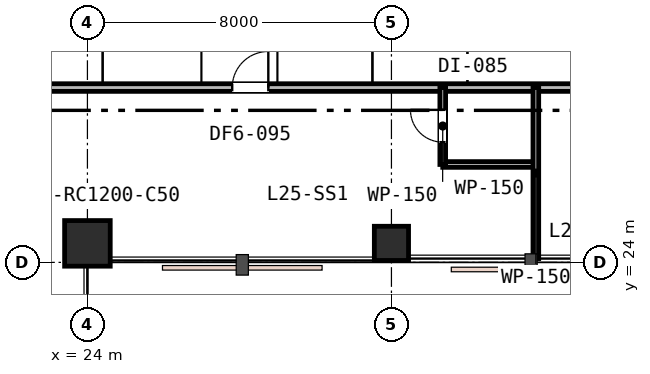
"""IFC4 building model, lengths in metres.
Left out: names, types, materials, properties, quantities, classifications, styles, units other than length and angle.
Written with IfcOpenShell. Run it as: python <this file> out.ifc"""

import sys

from ifc_helpers import new_model, si_unit, direction, frame, frame_2d, origin, origin_2d, place, context, subcontext, project, spatial, rectangle, extrude, element, fill, save


model = new_model("IFC4")
c1 = context("Model", 3, precision=1e-05, world=origin(), true_north=direction((0.0, 1.0)))
c2 = subcontext(c1, "Body", "Model", "MODEL_VIEW")
j1 = project(units=[si_unit("LENGTHUNIT", "METRE"), si_unit("PLANEANGLEUNIT", "RADIAN")], contexts=[c1])
p1 = place(None, origin())
s1 = spatial("IfcSite", under=j1, at=p1, CompositionType="ELEMENT")
p2 = place(p1, origin())
s2 = spatial("IfcBuilding", under=s1, at=p2, CompositionType="ELEMENT")
p3 = place(p2, frame((0.0, 0.0, 100.8)))
s3 = spatial("IfcBuildingStorey", under=s2, at=p3, CompositionType="ELEMENT", Elevation=100.8)
p4 = place(p3, frame((24.0, 24.5, 0.0), z_axis=(0.0, 0.0, 1.0), x_axis=(1.0, 0.0, 0.0)))
e1 = element("IfcColumn", 1, at=p4, inside=s3, PredefinedType="COLUMN", context=c2, shape_type="SweptSolid", body=[
    extrude(rectangle(XDim=1.2, YDim=1.2, at=origin_2d()), origin(), (0.0, 0.0, 1.0), 3.6),
])
p5 = place(p3, frame((32.0, 24.5, 0.0), z_axis=(0.0, 0.0, 1.0), x_axis=(1.0, 0.0, 0.0)))
e2 = element("IfcColumn", 2, at=p5, inside=s3, PredefinedType="COLUMN", context=c2, shape_type="SweptSolid", body=[
    extrude(rectangle(XDim=0.9, YDim=0.9, at=origin_2d()), origin(), (0.0, 0.0, 1.0), 3.6),
])
p6 = place(p3, frame((15.4, 28.6, 0.0), z_axis=(0.0, 0.0, 1.0), x_axis=(1.0, 0.0, 0.0)))
e3 = element("IfcWall", 3, at=p6, inside=s3, PredefinedType="PARTITIONING", context=c2, shape_type="SweptSolid", body=[
    extrude(rectangle(XDim=28.8, YDim=0.2, at=frame_2d((14.4, 0.0))), origin(), (0.0, 0.0, 1.0), 2.87),
])
p7 = place(p6, frame((12.41, 0.0, 0.0)))
e4 = element("IfcOpeningElement", 4, at=p7, cuts=e3, PredefinedType="OPENING", context=c2, shape_type="SweptSolid", body=[
    extrude(rectangle(XDim=0.95, YDim=2.15, at=frame_2d((0.475, 1.075))), frame((0.0, 0.11, 0.0), z_axis=(0.0, -1.0, 0.0), x_axis=(1.0, 0.0, 0.0)), (0.0, 0.0, 1.0), 0.22),
])
p8 = place(p6, frame((22.68, 0.0, 0.0)))
e5 = element("IfcOpeningElement", 5, at=p8, cuts=e3, PredefinedType="OPENING", context=c2, shape_type="SweptSolid", body=[
    extrude(rectangle(XDim=0.95, YDim=2.15, at=frame_2d((0.475, 1.075))), frame((0.0, 0.11, 0.0), z_axis=(0.0, -1.0, 0.0), x_axis=(1.0, 0.0, 0.0)), (0.0, 0.0, 1.0), 0.22),
])
p9 = place(p3, frame((33.35, 26.576, 0.0), z_axis=(0.0, 0.0, 1.0), x_axis=(1.0, 0.0, 0.0)))
e6 = element("IfcWall", 6, at=p9, inside=s3, PredefinedType="PARTITIONING", context=c2, shape_type="SweptSolid", body=[
    extrude(rectangle(XDim=2.45, YDim=0.15, at=frame_2d((1.225, 0.0))), origin(), (0.0, 0.0, 1.0), 3.01),
])
p10 = place(p3, frame((33.35, 26.576, 0.0), z_axis=(0.0, 0.0, 1.0), x_axis=(0.0, 1.0, 0.0)))
e7 = element("IfcWall", 7, at=p10, inside=s3, PredefinedType="PARTITIONING", context=c2, shape_type="SweptSolid", body=[
    extrude(rectangle(XDim=2.024, YDim=0.15, at=frame_2d((1.012, 0.0))), origin(), (0.0, 0.0, 1.0), 3.33),
])
p11 = place(p10, frame((0.587, 0.0, 0.0)))
e8 = element("IfcOpeningElement", 8, at=p11, cuts=e7, PredefinedType="OPENING", context=c2, shape_type="SweptSolid", body=[
    extrude(rectangle(XDim=0.85, YDim=2.15, at=frame_2d((0.425, 1.075))), frame((0.0, 0.085, 0.0), z_axis=(0.0, -1.0, 0.0), x_axis=(1.0, 0.0, 0.0)), (0.0, 0.0, 1.0), 0.17),
])
p12 = place(p3, frame((35.8, 28.6, 0.0), z_axis=(0.0, 0.0, 1.0), x_axis=(0.0, -1.0, 0.0)))
e9 = element("IfcWall", 9, at=p12, inside=s3, PredefinedType="PARTITIONING", context=c2, shape_type="SweptSolid", body=[
    extrude(rectangle(XDim=4.5, YDim=0.15, at=frame_2d((2.25, 0.0))), origin(), (0.0, 0.0, 1.0), 2.96),
])
p13 = place(p7, origin())
e10 = element("IfcDoor", 10, at=p13, inside=s3, OperationType="SINGLE_SWING_RIGHT", PredefinedType="DOOR", context=c2, shape_type="SweptSolid", body=[
    extrude(rectangle(XDim=0.95, YDim=2.15, at=frame_2d((0.475, 1.075))), frame((0.0, 0.025, 0.0), z_axis=(0.0, -1.0, 0.0), x_axis=(1.0, 0.0, 0.0)), (0.0, 0.0, 1.0), 0.05),
])
fill(e4, e10)
p14 = place(p11, origin())
e11 = element("IfcDoor", 11, at=p14, inside=s3, OperationType="SINGLE_SWING_RIGHT", PredefinedType="DOOR", context=c2, shape_type="SweptSolid", body=[
    extrude(rectangle(XDim=0.85, YDim=2.15, at=frame_2d((0.425, 1.075))), frame((0.0, 0.025, 0.0), z_axis=(0.0, -1.0, 0.0), x_axis=(1.0, 0.0, 0.0)), (0.0, 0.0, 1.0), 0.05),
])
fill(e8, e11)
save(model, sys.argv[1])
